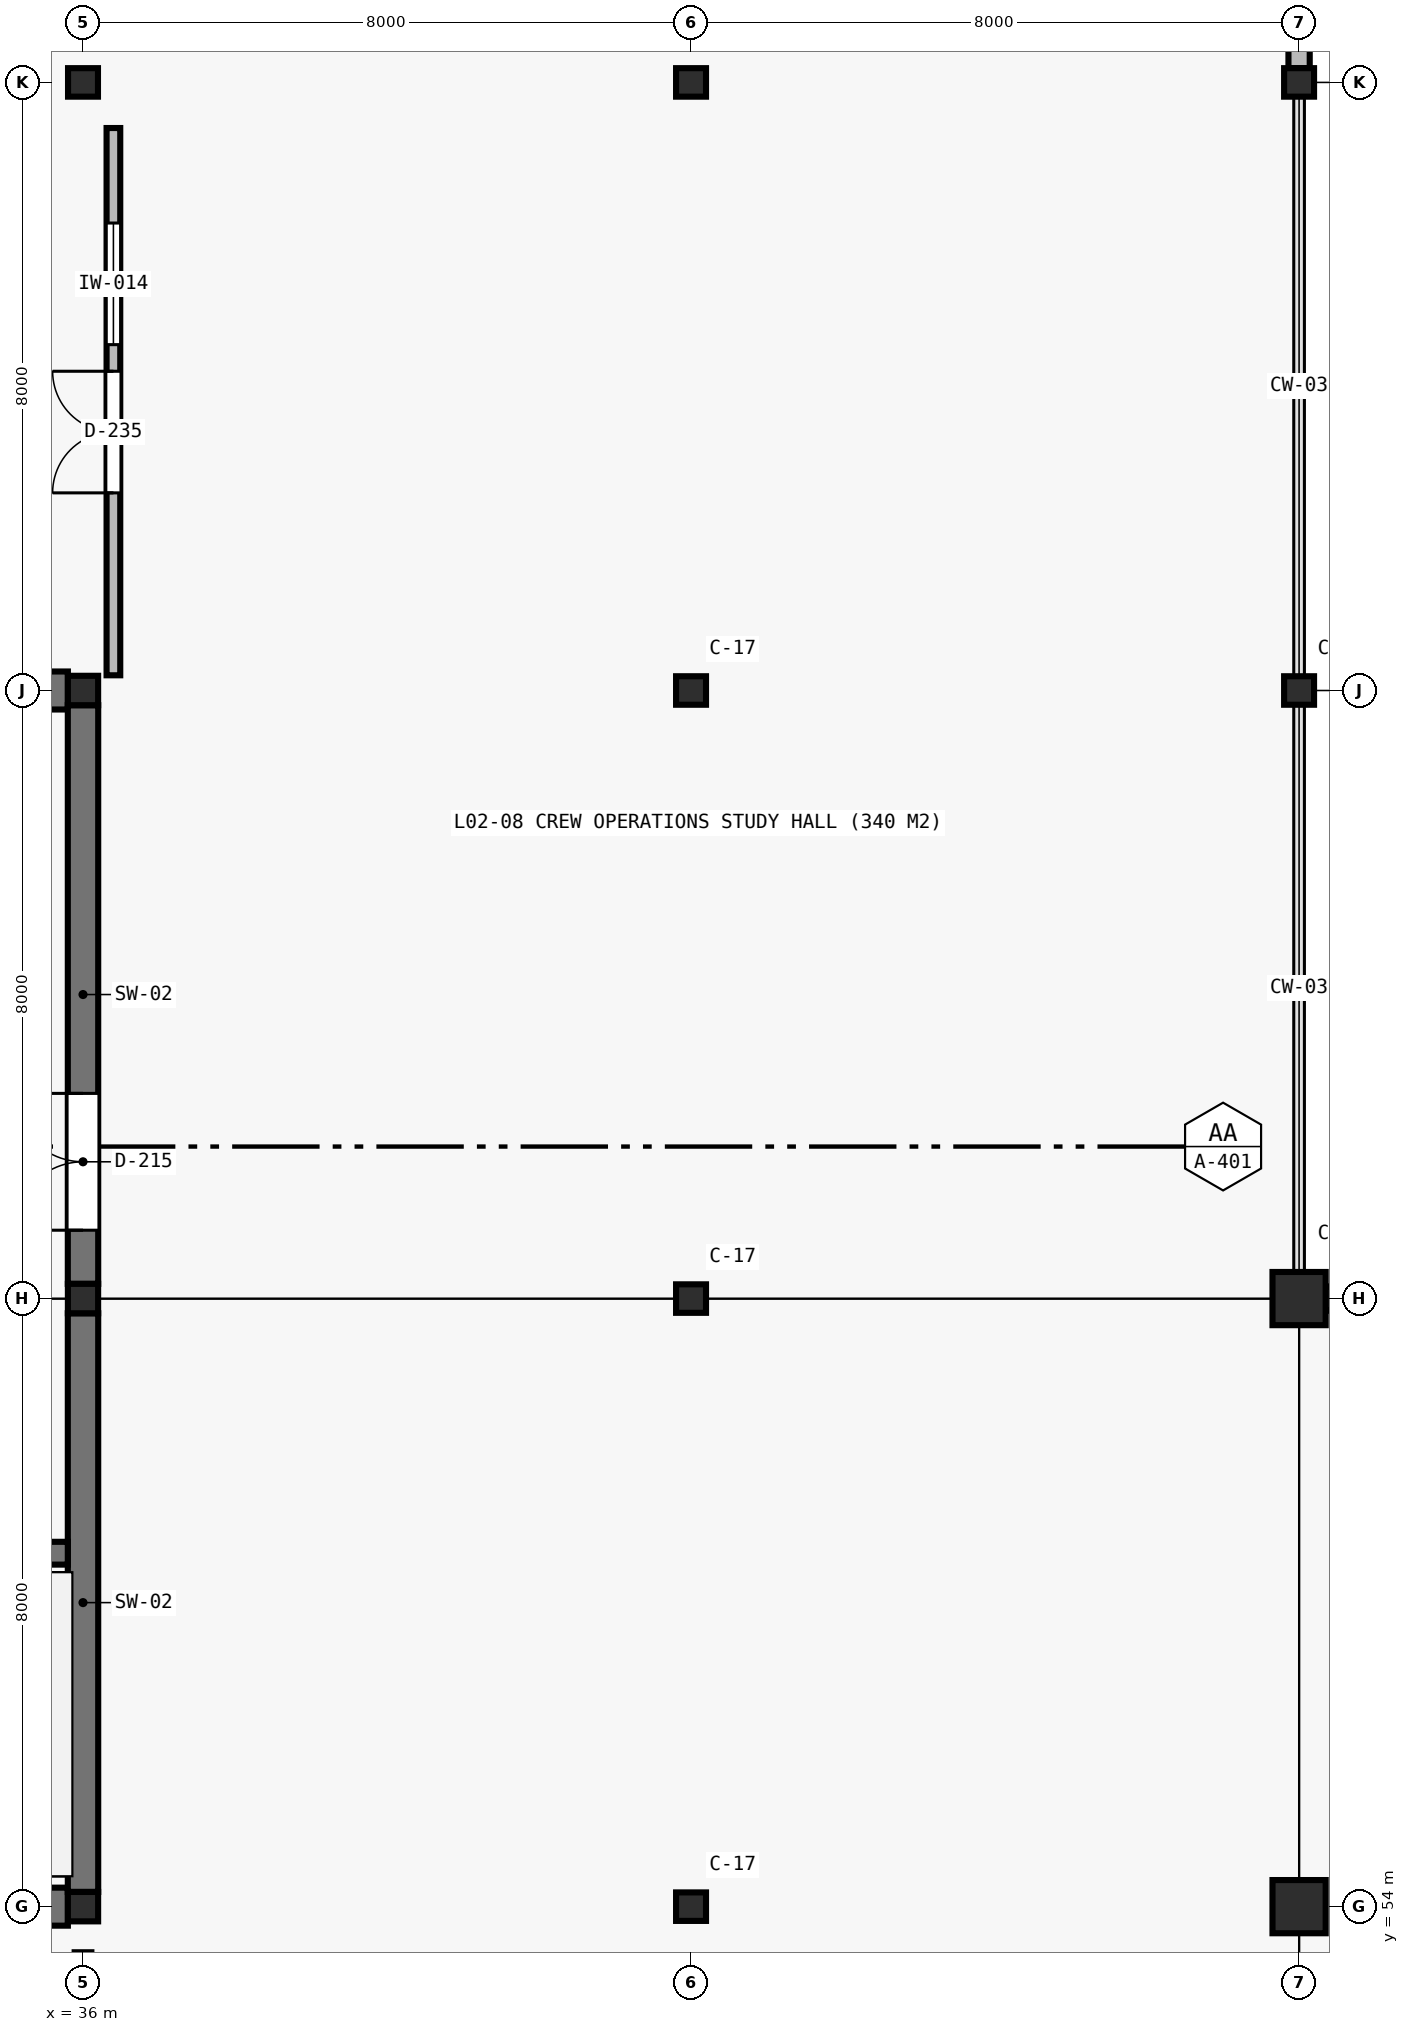
"""IFC4 building model, lengths in metres.
Left out: names, types, materials, properties, quantities, classifications, styles, units other than length and angle.
Written with IfcOpenShell. Run it as: python <this file> out.ifc"""

import sys

from ifc_helpers import new_model, si_unit, direction, frame, frame_2d, origin, origin_2d, place, context, subcontext, project, spatial, rectangle, i_section, extrude, element, fill, save


model = new_model("IFC4")
c1 = context("Model", 3, precision=1e-05, world=origin(), true_north=direction((0.0, 1.0)))
c2 = subcontext(c1, "Body", "Model", "MODEL_VIEW")
j1 = project(units=[si_unit("LENGTHUNIT", "METRE"), si_unit("PLANEANGLEUNIT", "RADIAN")], contexts=[c1])
p1 = place(None, origin())
s1 = spatial("IfcSite", under=j1, at=p1, CompositionType="ELEMENT")
p2 = place(p1, origin())
s2 = spatial("IfcBuilding", under=s1, at=p2, CompositionType="ELEMENT")
p3 = place(p2, frame((0.0, 0.0, 11.2)))
s3 = spatial("IfcBuildingStorey", under=s2, at=p3, CompositionType="ELEMENT", Elevation=11.2)
for number, where, z_axis, x_axis in (
    (1, (36.0, 54.0, 0.0), (0.0, 0.0, 1.0), (1.0, 0.0, 0.0)),
    (2, (36.0, 62.0, 0.0), (0.0, 0.0, 1.0), (1.0, 0.0, 0.0)),
    (3, (36.0, 70.0, 0.0), (0.0, 0.0, 1.0), (1.0, 0.0, 0.0)),
):
    element("IfcColumn", number, at=place(p3, frame(where, z_axis=z_axis, x_axis=x_axis)), inside=s3, PredefinedType="COLUMN", context=c2, shape_type="SweptSolid", body=[
        extrude(i_section(OverallWidth=0.398, OverallDepth=0.387, WebThickness=0.021, FlangeThickness=0.033, at=origin_2d()), origin(), (0.0, 0.0, 1.0), 4.0),
    ])
for number, where, z_axis, x_axis in (
    (4, (36.0, 78.0, 0.0), (0.0, 0.0, 1.0), (1.0, 0.0, 0.0)),
    (5, (44.0, 54.0, 0.0), (0.0, 0.0, 1.0), (1.0, 0.0, 0.0)),
    (6, (44.0, 62.0, 0.0), (0.0, 0.0, 1.0), (1.0, 0.0, 0.0)),
    (7, (44.0, 70.0, 0.0), (0.0, 0.0, 1.0), (1.0, 0.0, 0.0)),
    (8, (44.0, 78.0, 0.0), (0.0, 0.0, 1.0), (1.0, 0.0, 0.0)),
):
    element("IfcColumn", number, at=place(p3, frame(where, z_axis=z_axis, x_axis=x_axis)), inside=s3, PredefinedType="COLUMN", context=c2, shape_type="SweptSolid", body=[
        extrude(i_section(OverallWidth=0.394, OverallDepth=0.375, WebThickness=0.017, FlangeThickness=0.028, at=origin_2d()), origin(), (0.0, 0.0, 1.0), 4.0),
    ])
for number, where, z_axis, x_axis in (
    (9, (52.0, 54.0, 0.0), (0.0, 0.0, 1.0), (1.0, 0.0, 0.0)),
    (10, (52.0, 62.0, 0.0), (0.0, 0.0, 1.0), (1.0, 0.0, 0.0)),
):
    element("IfcColumn", number, at=place(p3, frame(where, z_axis=z_axis, x_axis=x_axis)), inside=s3, PredefinedType="COLUMN", context=c2, shape_type="SweptSolid", body=[
        extrude(rectangle(XDim=0.7, YDim=0.7, at=origin_2d()), origin(), (0.0, 0.0, 1.0), 4.0),
    ])
for number, where, z_axis, x_axis in (
    (11, (52.0, 70.0, 0.0), (0.0, 0.0, 1.0), (1.0, 0.0, 0.0)),
    (12, (52.0, 78.0, 0.0), (0.0, 0.0, 1.0), (1.0, 0.0, 0.0)),
):
    element("IfcColumn", number, at=place(p3, frame(where, z_axis=z_axis, x_axis=x_axis)), inside=s3, PredefinedType="COLUMN", context=c2, shape_type="SweptSolid", body=[
        extrude(i_section(OverallWidth=0.394, OverallDepth=0.375, WebThickness=0.017, FlangeThickness=0.028, at=origin_2d()), origin(), (0.0, 0.0, 1.0), 4.0),
    ])
for number, where, z_axis, x_axis in (
    (13, (28.0, 54.0, 0.0), (0.0, 0.0, 1.0), (1.0, 0.0, 0.0)),
    (14, (28.0, 70.0, 0.0), (0.0, 0.0, 1.0), (1.0, 0.0, 0.0)),
):
    element("IfcWall", number, at=place(p3, frame(where, z_axis=z_axis, x_axis=x_axis)), inside=s3, PredefinedType="SHEAR", context=c2, shape_type="SweptSolid", body=[
        extrude(rectangle(XDim=7.801, YDim=0.5, at=frame_2d((3.9, 0.0))), origin(), (0.0, 0.0, 1.0), 4.0),
    ])
p4 = place(p3, frame((36.0, 54.194, 0.0), z_axis=(0.0, 0.0, 1.0), x_axis=(0.0, 1.0, 0.0)))
e15 = element("IfcWall", 15, at=p4, inside=s3, PredefinedType="SHEAR", context=c2, shape_type="SweptSolid", body=[
    extrude(rectangle(XDim=7.613, YDim=0.4, at=frame_2d((3.806, 0.0))), origin(), (0.0, 0.0, 1.0), 4.0),
])
p5 = place(p3, frame((36.0, 62.194, 0.0), z_axis=(0.0, 0.0, 1.0), x_axis=(0.0, 1.0, 0.0)))
e16 = element("IfcWall", 16, at=p5, inside=s3, PredefinedType="SHEAR", context=c2, shape_type="SweptSolid", body=[
    extrude(rectangle(XDim=7.613, YDim=0.4, at=frame_2d((3.806, 0.0))), origin(), (0.0, 0.0, 1.0), 4.0),
])
p6 = place(p5, frame((0.706, 0.0, 0.0)))
e17 = element("IfcOpeningElement", 17, at=p6, cuts=e16, PredefinedType="OPENING", context=c2, shape_type="SweptSolid", body=[
    extrude(rectangle(XDim=1.8, YDim=2.2, at=frame_2d((0.9, 1.1))), frame((0.0, 0.21, 0.0), z_axis=(0.0, -1.0, 0.0), x_axis=(1.0, 0.0, 0.0)), (0.0, 0.0, 1.0), 0.42),
])
p7 = place(p3, frame((26.05, 58.65, 0.0), z_axis=(0.0, 0.0, 1.0), x_axis=(1.0, 0.0, 0.0)))
e18 = element("IfcWall", 18, at=p7, inside=s3, PredefinedType="SHEAR", context=c2, shape_type="SweptSolid", body=[
    extrude(rectangle(XDim=9.75, YDim=0.3, at=frame_2d((4.875, 0.0))), origin(), (0.0, 0.0, 1.0), 4.0),
])
p8 = place(p7, frame((0.55, 0.0, 0.0)))
e19 = element("IfcOpeningElement", 19, at=p8, cuts=e18, PredefinedType="OPENING", context=c2, shape_type="SweptSolid", body=[
    extrude(rectangle(XDim=1.2, YDim=2.2, at=frame_2d((0.6, 1.1))), frame((0.0, 0.16, 0.0), z_axis=(0.0, -1.0, 0.0), x_axis=(1.0, 0.0, 0.0)), (0.0, 0.0, 1.0), 0.32),
])
p9 = place(p3, frame((52.0, 85.812, 0.0), z_axis=(0.0, 0.0, 1.0), x_axis=(0.0, -1.0, 0.0)))
e20 = element("IfcWall", 20, at=p9, inside=s3, PredefinedType="STANDARD", context=c2, shape_type="SweptSolid", body=[
    extrude(rectangle(XDim=7.625, YDim=0.28, at=frame_2d((3.812, 0.0))), origin(), (0.0, 0.0, 1.0), 3.25),
])
p10 = place(p9, frame((3.062, 0.0, 0.95)))
e21 = element("IfcOpeningElement", 21, at=p10, cuts=e20, PredefinedType="OPENING", context=c2, shape_type="SweptSolid", body=[
    extrude(rectangle(XDim=1.5, YDim=2.0, at=frame_2d((0.75, 1.0))), frame((0.0, 0.15, 0.0), z_axis=(0.0, -1.0, 0.0), x_axis=(1.0, 0.0, 0.0)), (0.0, 0.0, 1.0), 0.3),
])
p11 = place(p3, frame((52.35, 62.0, 0.0), z_axis=(0.0, 0.0, 1.0), x_axis=(1.0, 0.0, 0.0)))
e22 = element("IfcWall", 22, at=p11, inside=s3, PredefinedType="STANDARD", context=c2, shape_type="SweptSolid", body=[
    extrude(rectangle(XDim=7.3, YDim=0.32, at=frame_2d((3.65, 0.0))), origin(), (0.0, 0.0, 1.0), 3.23),
])
p12 = place(p11, frame((2.45, 0.0, 0.95)))
e23 = element("IfcOpeningElement", 23, at=p12, cuts=e22, PredefinedType="OPENING", context=c2, shape_type="SweptSolid", body=[
    extrude(rectangle(XDim=2.4, YDim=1.8, at=frame_2d((1.2, 0.9))), frame((0.0, 0.17, 0.0), z_axis=(0.0, -1.0, 0.0), x_axis=(1.0, 0.0, 0.0)), (0.0, 0.0, 1.0), 0.34),
])
p13 = place(p3, frame((36.4, 70.2, 0.0), z_axis=(0.0, 0.0, 1.0), x_axis=(0.0, 1.0, 0.0)))
e24 = element("IfcWall", 24, at=p13, inside=s3, PredefinedType="PARTITIONING", context=c2, shape_type="SweptSolid", body=[
    extrude(rectangle(XDim=7.2, YDim=0.18, at=frame_2d((3.6, 0.0))), origin(), (0.0, 0.0, 1.0), 4.0),
])
p14 = place(p13, frame((2.4, 0.0, 0.0)))
e25 = element("IfcOpeningElement", 25, at=p14, cuts=e24, PredefinedType="OPENING", context=c2, shape_type="SweptSolid", body=[
    extrude(rectangle(XDim=1.6, YDim=2.2, at=frame_2d((0.8, 1.1))), frame((0.0, 0.1, 0.0), z_axis=(0.0, -1.0, 0.0), x_axis=(1.0, 0.0, 0.0)), (0.0, 0.0, 1.0), 0.2),
])
p15 = place(p13, frame((4.35, 0.0, 0.95)))
e26 = element("IfcOpeningElement", 26, at=p15, cuts=e24, PredefinedType="OPENING", context=c2, shape_type="SweptSolid", body=[
    extrude(rectangle(XDim=1.6, YDim=1.3, at=frame_2d((0.8, 0.65))), frame((0.0, 0.1, 0.0), z_axis=(0.0, -1.0, 0.0), x_axis=(1.0, 0.0, 0.0)), (0.0, 0.0, 1.0), 0.2),
])
p16 = place(p6, origin())
e27 = element("IfcDoor", 27, at=p16, inside=s3, OperationType="DOUBLE_DOOR_SINGLE_SWING", PredefinedType="DOOR", context=c2, shape_type="SweptSolid", body=[
    extrude(rectangle(XDim=1.8, YDim=2.2, at=frame_2d((0.9, 1.1))), frame((0.0, 0.025, 0.0), z_axis=(0.0, -1.0, 0.0), x_axis=(1.0, 0.0, 0.0)), (0.0, 0.0, 1.0), 0.05),
])
fill(e17, e27)
p17 = place(p14, origin())
e28 = element("IfcDoor", 28, at=p17, inside=s3, OperationType="DOUBLE_DOOR_SINGLE_SWING", PredefinedType="DOOR", context=c2, shape_type="SweptSolid", body=[
    extrude(rectangle(XDim=1.6, YDim=2.2, at=frame_2d((0.8, 1.1))), frame((0.0, 0.025, 0.0), z_axis=(0.0, -1.0, 0.0), x_axis=(1.0, 0.0, 0.0)), (0.0, 0.0, 1.0), 0.05),
])
fill(e25, e28)
p18 = place(p15, origin())
e29 = element("IfcWindow", 29, at=p18, inside=s3, PartitioningType="SINGLE_PANEL", PredefinedType="WINDOW", context=c2, shape_type="SweptSolid", body=[
    extrude(rectangle(XDim=1.6, YDim=1.3, at=frame_2d((0.8, 0.65))), frame((0.0, 0.03, 0.0), z_axis=(0.0, -1.0, 0.0), x_axis=(1.0, 0.0, 0.0)), (0.0, 0.0, 1.0), 0.06),
])
fill(e26, e29)
save(model, sys.argv[1])
